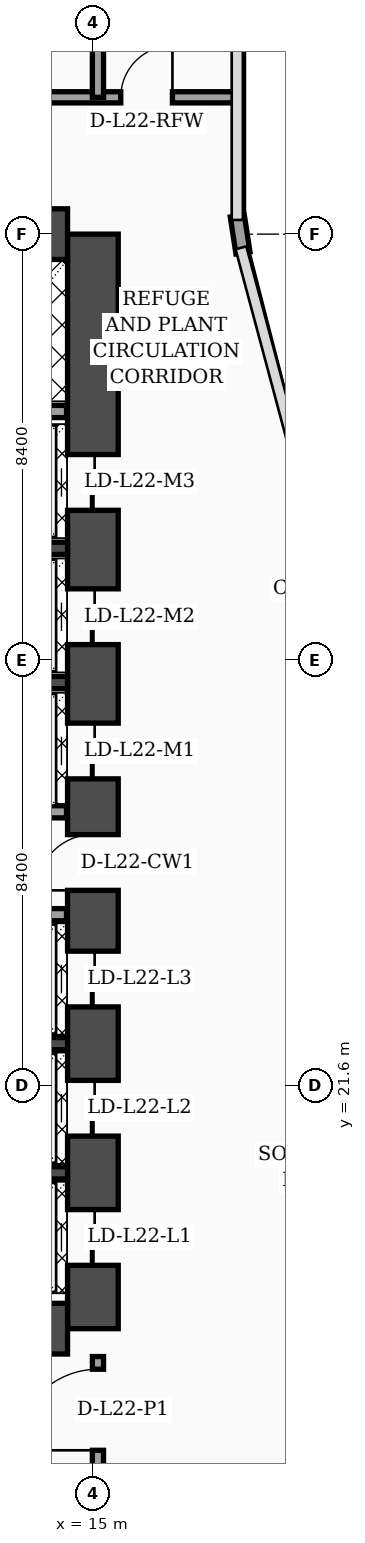
"""IFC4 building model, lengths in metres.
Left out: names, types, materials, properties, quantities, classifications, styles, units other than length and angle.
Written with IfcOpenShell. Run it as: python <this file> out.ifc"""

import sys

from ifc_helpers import new_model, si_unit, direction, frame, frame_2d, origin, place, context, subcontext, project, spatial, rectangle, extrude, element, fill, save


model = new_model("IFC4")
c1 = context("Model", 3, precision=1e-05, world=origin(), true_north=direction((0.0, 1.0)))
c2 = subcontext(c1, "Body", "Model", "MODEL_VIEW")
j1 = project(units=[si_unit("LENGTHUNIT", "METRE"), si_unit("PLANEANGLEUNIT", "RADIAN")], contexts=[c1])
p1 = place(None, origin())
s1 = spatial("IfcSite", under=j1, at=p1, CompositionType="ELEMENT")
p2 = place(p1, origin())
s2 = spatial("IfcBuilding", under=s1, at=p2, CompositionType="ELEMENT")
p3 = place(p2, frame((0.0, 0.0, 92.6)))
s3 = spatial("IfcBuildingStorey", under=s2, at=p3, CompositionType="ELEMENT", Elevation=92.6)
p4 = place(p3, frame((15.0, 16.8, 0.0), z_axis=(0.0, 0.0, 1.0), x_axis=(0.0, 1.0, 0.0)))
e1 = element("IfcWall", 1, at=p4, inside=s3, PredefinedType="SHEAR", context=c2, shape_type="SweptSolid", body=[
    extrude(rectangle(XDim=21.6, YDim=1.0, at=frame_2d((10.8, 0.0))), origin(), (0.0, 0.0, 1.0), 4.35),
])
p5 = place(p4, frame((8.65, 0.0, 0.0)))
e2 = element("IfcOpeningElement", 2, at=p5, cuts=e1, PredefinedType="OPENING", context=c2, shape_type="SweptSolid", body=[
    extrude(rectangle(XDim=1.1, YDim=2.2, at=frame_2d((0.55, 1.1))), frame((0.0, 0.51, 0.0), z_axis=(0.0, -1.0, 0.0), x_axis=(1.0, 0.0, 0.0)), (0.0, 0.0, 1.0), 1.02),
])
p6 = place(p4, frame((1.25, 0.0, 0.0)))
e3 = element("IfcOpeningElement", 3, at=p6, cuts=e1, PredefinedType="OPENING", context=c2, shape_type="SweptSolid", body=[
    extrude(rectangle(XDim=1.1, YDim=2.2, at=frame_2d((0.55, 1.1))), frame((0.0, 0.51, 0.0), z_axis=(0.0, -1.0, 0.0), x_axis=(1.0, 0.0, 0.0)), (0.0, 0.0, 1.0), 1.02),
])
p7 = place(p4, frame((3.8, 0.0, 0.0)))
e4 = element("IfcOpeningElement", 4, at=p7, cuts=e1, PredefinedType="OPENING", context=c2, shape_type="SweptSolid", body=[
    extrude(rectangle(XDim=1.1, YDim=2.2, at=frame_2d((0.55, 1.1))), frame((0.0, 0.51, 0.0), z_axis=(0.0, -1.0, 0.0), x_axis=(1.0, 0.0, 0.0)), (0.0, 0.0, 1.0), 1.02),
])
p8 = place(p4, frame((6.35, 0.0, 0.0)))
e5 = element("IfcOpeningElement", 5, at=p8, cuts=e1, PredefinedType="OPENING", context=c2, shape_type="SweptSolid", body=[
    extrude(rectangle(XDim=1.1, YDim=2.2, at=frame_2d((0.55, 1.1))), frame((0.0, 0.51, 0.0), z_axis=(0.0, -1.0, 0.0), x_axis=(1.0, 0.0, 0.0)), (0.0, 0.0, 1.0), 1.02),
])
p9 = place(p4, frame((10.85, 0.0, 0.0)))
e6 = element("IfcOpeningElement", 6, at=p9, cuts=e1, PredefinedType="OPENING", context=c2, shape_type="SweptSolid", body=[
    extrude(rectangle(XDim=1.1, YDim=2.2, at=frame_2d((0.55, 1.1))), frame((0.0, 0.51, 0.0), z_axis=(0.0, -1.0, 0.0), x_axis=(1.0, 0.0, 0.0)), (0.0, 0.0, 1.0), 1.02),
])
p10 = place(p4, frame((13.5, 0.0, 0.0)))
e7 = element("IfcOpeningElement", 7, at=p10, cuts=e1, PredefinedType="OPENING", context=c2, shape_type="SweptSolid", body=[
    extrude(rectangle(XDim=1.1, YDim=2.2, at=frame_2d((0.55, 1.1))), frame((0.0, 0.51, 0.0), z_axis=(0.0, -1.0, 0.0), x_axis=(1.0, 0.0, 0.0)), (0.0, 0.0, 1.0), 1.02),
])
p11 = place(p4, frame((16.15, 0.0, 0.0)))
e8 = element("IfcOpeningElement", 8, at=p11, cuts=e1, PredefinedType="OPENING", context=c2, shape_type="SweptSolid", body=[
    extrude(rectangle(XDim=1.1, YDim=2.2, at=frame_2d((0.55, 1.1))), frame((0.0, 0.51, 0.0), z_axis=(0.0, -1.0, 0.0), x_axis=(1.0, 0.0, 0.0)), (0.0, 0.0, 1.0), 1.02),
])
for number, where, z_axis, x_axis in (
    (9, (4.7, 38.4, 0.0), (0.0, 0.0, 1.0), (1.0, 0.0, 0.0)),
    (10, (4.7, 16.8, 0.0), (0.0, 0.0, 1.0), (1.0, 0.0, 0.0)),
):
    element("IfcWall", number, at=place(p3, frame(where, z_axis=z_axis, x_axis=x_axis)), inside=s3, PredefinedType="SHEAR", context=c2, shape_type="SweptSolid", body=[
        extrude(rectangle(XDim=9.8, YDim=1.0, at=frame_2d((4.9, 0.0))), origin(), (0.0, 0.0, 1.0), 4.35),
    ])
for number, where, z_axis, x_axis in (
    (11, (12.18, 19.875, 0.0), (0.0, 0.0, 1.0), (1.0, 0.0, 0.0)),
    (12, (12.18, 22.425, 0.0), (0.0, 0.0, 1.0), (1.0, 0.0, 0.0)),
    (13, (12.18, 29.55, 0.0), (0.0, 0.0, 1.0), (1.0, 0.0, 0.0)),
    (14, (12.18, 32.2, 0.0), (0.0, 0.0, 1.0), (1.0, 0.0, 0.0)),
):
    element("IfcWall", number, at=place(p3, frame(where, z_axis=z_axis, x_axis=x_axis)), inside=s3, PredefinedType="SOLIDWALL", context=c2, shape_type="SweptSolid", body=[
        extrude(rectangle(XDim=2.32, YDim=0.24, at=frame_2d((1.16, 0.0))), origin(), (0.0, 0.0, 1.0), 4.35),
    ])
p12 = place(p3, frame((17.962, 38.03, 0.0), z_axis=(0.0, 0.0, 1.0), x_axis=(-0.15141125477, 0.988470855377, 0.0)))
e15 = element("IfcWall", 15, at=p12, inside=s3, PredefinedType="SOLIDWALL", context=c2, shape_type="SweptSolid", body=[
    extrude(rectangle(XDim=0.739, YDim=0.28, at=frame_2d((0.369, 0.0))), origin(), (0.0, 0.0, 1.0), 4.35),
])
p13 = place(p3, frame((12.15, 24.97, 0.0), z_axis=(0.0, 0.0, 1.0), x_axis=(1.0, 0.0, 0.0)))
e16 = element("IfcWall", 16, at=p13, inside=s3, PredefinedType="SOLIDWALL", context=c2, shape_type="SweptSolid", body=[
    extrude(rectangle(XDim=2.33, YDim=0.24, at=frame_2d((1.165, 0.0))), origin(), (0.0, 0.0, 1.0), 3.65),
])
p14 = place(p3, frame((12.25, 27.0, 0.0), z_axis=(0.0, 0.0, 1.0), x_axis=(1.0, 0.0, 0.0)))
e17 = element("IfcWall", 17, at=p14, inside=s3, PredefinedType="SOLIDWALL", context=c2, shape_type="SweptSolid", body=[
    extrude(rectangle(XDim=2.23, YDim=0.24, at=frame_2d((1.115, 0.0))), origin(), (0.0, 0.0, 1.0), 4.35),
])
p15 = place(p3, frame((9.66, 34.9, 0.0), z_axis=(0.0, 0.0, 1.0), x_axis=(1.0, 0.0, 0.0)))
e18 = element("IfcWall", 18, at=p15, inside=s3, PredefinedType="SOLIDWALL", context=c2, shape_type="SweptSolid", body=[
    extrude(rectangle(XDim=4.82, YDim=0.24, at=frame_2d((2.41, 0.0))), origin(), (0.0, 0.0, 1.0), 4.35),
])
p16 = place(p3, frame((4.2, 41.1, 0.0), z_axis=(0.0, 0.0, 1.0), x_axis=(1.0, 0.0, 0.0)))
e19 = element("IfcWall", 19, at=p16, inside=s3, PredefinedType="SOLIDWALL", context=c2, shape_type="SweptSolid", body=[
    extrude(rectangle(XDim=13.65, YDim=0.22, at=frame_2d((6.825, 0.0))), origin(), (0.0, 0.0, 1.0), 3.65),
])
p17 = place(p16, frame((1.8, 0.0, 0.0)))
e20 = element("IfcOpeningElement", 20, at=p17, cuts=e19, PredefinedType="OPENING", context=c2, shape_type="SweptSolid", body=[
    extrude(rectangle(XDim=0.98, YDim=2.15, at=frame_2d((0.49, 1.075))), frame((0.0, 0.12, 0.0), z_axis=(0.0, -1.0, 0.0), x_axis=(1.0, 0.0, 0.0)), (0.0, 0.0, 1.0), 0.24),
])
p18 = place(p16, frame((6.8, 0.0, 0.0)))
e21 = element("IfcOpeningElement", 21, at=p18, cuts=e19, PredefinedType="OPENING", context=c2, shape_type="SweptSolid", body=[
    extrude(rectangle(XDim=1.15, YDim=2.2, at=frame_2d((0.575, 1.1))), frame((0.0, 0.12, 0.0), z_axis=(0.0, -1.0, 0.0), x_axis=(1.0, 0.0, 0.0)), (0.0, 0.0, 1.0), 0.24),
])
p19 = place(p16, frame((11.35, 0.0, 0.0)))
e22 = element("IfcOpeningElement", 22, at=p19, cuts=e19, PredefinedType="OPENING", context=c2, shape_type="SweptSolid", body=[
    extrude(rectangle(XDim=1.02, YDim=2.2, at=frame_2d((0.51, 1.1))), frame((0.0, 0.12, 0.0), z_axis=(0.0, -1.0, 0.0), x_axis=(1.0, 0.0, 0.0)), (0.0, 0.0, 1.0), 0.24),
])
p20 = place(p3, frame((15.1, 41.1, 0.0), z_axis=(0.0, 0.0, 1.0), x_axis=(0.0, 1.0, 0.0)))
e23 = element("IfcWall", 23, at=p20, inside=s3, PredefinedType="SOLIDWALL", context=c2, shape_type="SweptSolid", body=[
    extrude(rectangle(XDim=6.7, YDim=0.22, at=frame_2d((3.35, 0.0))), origin(), (0.0, 0.0, 1.0), 3.65),
])
p21 = place(p3, frame((15.1, 4.2, 0.0), z_axis=(0.0, 0.0, 1.0), x_axis=(0.0, 1.0, 0.0)))
e24 = element("IfcWall", 24, at=p21, inside=s3, PredefinedType="SOLIDWALL", context=c2, shape_type="SweptSolid", body=[
    extrude(rectangle(XDim=12.05, YDim=0.22, at=frame_2d((6.025, 0.0))), origin(), (0.0, 0.0, 1.0), 3.15),
])
p22 = place(p21, frame((10.2, 0.0, 0.0)))
e25 = element("IfcOpeningElement", 25, at=p22, cuts=e24, PredefinedType="OPENING", context=c2, shape_type="SweptSolid", body=[
    extrude(rectangle(XDim=1.6, YDim=2.35, at=frame_2d((0.8, 1.175))), frame((0.0, 0.12, 0.0), z_axis=(0.0, -1.0, 0.0), x_axis=(1.0, 0.0, 0.0)), (0.0, 0.0, 1.0), 0.24),
])
p23 = place(p19, origin())
e26 = element("IfcDoor", 26, at=p23, inside=s3, OperationType="SINGLE_SWING_RIGHT", PredefinedType="DOOR", context=c2, shape_type="SweptSolid", body=[
    extrude(rectangle(XDim=1.02, YDim=2.2, at=frame_2d((0.51, 1.1))), frame((0.0, 0.025, 0.0), z_axis=(0.0, -1.0, 0.0), x_axis=(1.0, 0.0, 0.0)), (0.0, 0.0, 1.0), 0.05),
])
fill(e22, e26)
p24 = place(p22, origin())
e27 = element("IfcDoor", 27, at=p24, inside=s3, OperationType="SINGLE_SWING_LEFT", PredefinedType="DOOR", context=c2, shape_type="SweptSolid", body=[
    extrude(rectangle(XDim=1.6, YDim=2.35, at=frame_2d((0.8, 1.175))), frame((0.0, 0.025, 0.0), z_axis=(0.0, -1.0, 0.0), x_axis=(1.0, 0.0, 0.0)), (0.0, 0.0, 1.0), 0.05),
])
fill(e25, e27)
p25 = place(p5, origin())
e28 = element("IfcDoor", 28, at=p25, inside=s3, OperationType="SINGLE_SWING_LEFT", PredefinedType="DOOR", context=c2, shape_type="SweptSolid", body=[
    extrude(rectangle(XDim=1.1, YDim=2.2, at=frame_2d((0.55, 1.1))), frame((0.0, 0.025, 0.0), z_axis=(0.0, -1.0, 0.0), x_axis=(1.0, 0.0, 0.0)), (0.0, 0.0, 1.0), 0.05),
])
fill(e2, e28)
p26 = place(p6, origin())
e29 = element("IfcDoor", 29, at=p26, inside=s3, OperationType="DOUBLE_DOOR_SLIDING", PredefinedType="DOOR", context=c2, shape_type="SweptSolid", body=[
    extrude(rectangle(XDim=1.1, YDim=2.2, at=frame_2d((0.55, 1.1))), frame((0.0, 0.025, 0.0), z_axis=(0.0, -1.0, 0.0), x_axis=(1.0, 0.0, 0.0)), (0.0, 0.0, 1.0), 0.05),
])
fill(e3, e29)
p27 = place(p7, origin())
e30 = element("IfcDoor", 30, at=p27, inside=s3, OperationType="DOUBLE_DOOR_SLIDING", PredefinedType="DOOR", context=c2, shape_type="SweptSolid", body=[
    extrude(rectangle(XDim=1.1, YDim=2.2, at=frame_2d((0.55, 1.1))), frame((0.0, 0.025, 0.0), z_axis=(0.0, -1.0, 0.0), x_axis=(1.0, 0.0, 0.0)), (0.0, 0.0, 1.0), 0.05),
])
fill(e4, e30)
p28 = place(p8, origin())
e31 = element("IfcDoor", 31, at=p28, inside=s3, OperationType="DOUBLE_DOOR_SLIDING", PredefinedType="DOOR", context=c2, shape_type="SweptSolid", body=[
    extrude(rectangle(XDim=1.1, YDim=2.2, at=frame_2d((0.55, 1.1))), frame((0.0, 0.025, 0.0), z_axis=(0.0, -1.0, 0.0), x_axis=(1.0, 0.0, 0.0)), (0.0, 0.0, 1.0), 0.05),
])
fill(e5, e31)
p29 = place(p9, origin())
e32 = element("IfcDoor", 32, at=p29, inside=s3, OperationType="DOUBLE_DOOR_SLIDING", PredefinedType="DOOR", context=c2, shape_type="SweptSolid", body=[
    extrude(rectangle(XDim=1.1, YDim=2.2, at=frame_2d((0.55, 1.1))), frame((0.0, 0.025, 0.0), z_axis=(0.0, -1.0, 0.0), x_axis=(1.0, 0.0, 0.0)), (0.0, 0.0, 1.0), 0.05),
])
fill(e6, e32)
p30 = place(p10, origin())
e33 = element("IfcDoor", 33, at=p30, inside=s3, OperationType="DOUBLE_DOOR_SLIDING", PredefinedType="DOOR", context=c2, shape_type="SweptSolid", body=[
    extrude(rectangle(XDim=1.1, YDim=2.2, at=frame_2d((0.55, 1.1))), frame((0.0, 0.025, 0.0), z_axis=(0.0, -1.0, 0.0), x_axis=(1.0, 0.0, 0.0)), (0.0, 0.0, 1.0), 0.05),
])
fill(e7, e33)
p31 = place(p11, origin())
e34 = element("IfcDoor", 34, at=p31, inside=s3, OperationType="DOUBLE_DOOR_SLIDING", PredefinedType="DOOR", context=c2, shape_type="SweptSolid", body=[
    extrude(rectangle(XDim=1.1, YDim=2.2, at=frame_2d((0.55, 1.1))), frame((0.0, 0.025, 0.0), z_axis=(0.0, -1.0, 0.0), x_axis=(1.0, 0.0, 0.0)), (0.0, 0.0, 1.0), 0.05),
])
fill(e8, e34)
save(model, sys.argv[1])
